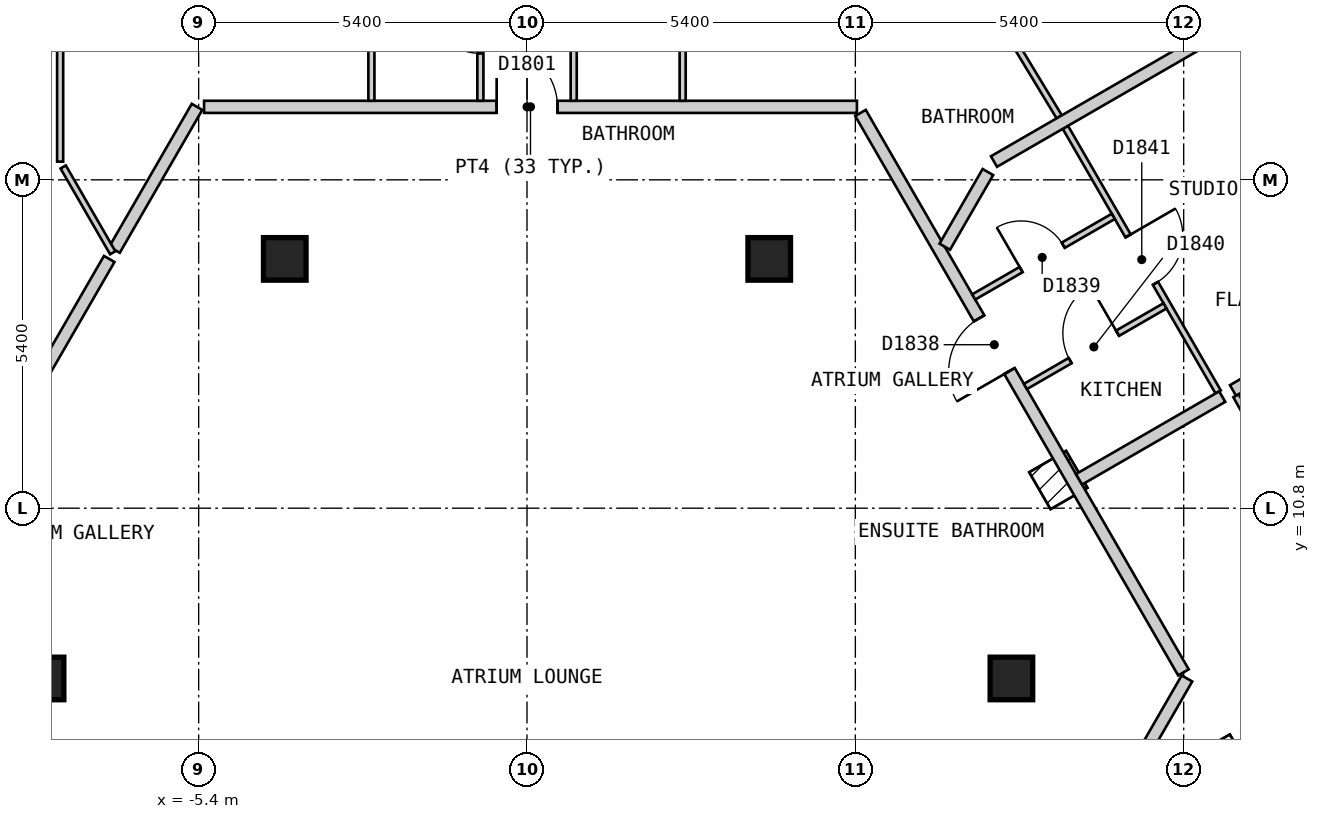
"""IFC4 building model, lengths in metres.
Left out: names, types, materials, properties, quantities, classifications, styles, units other than length and angle.
Written with IfcOpenShell. Run it as: python <this file> out.ifc"""

import sys

from ifc_helpers import new_model, si_unit, direction, frame, frame_2d, origin, origin_2d, place, context, subcontext, project, spatial, rectangle, extrude, element, fill, save


model = new_model("IFC4")
c1 = context("Model", 3, precision=1e-05, world=origin(), true_north=direction((0.0, 1.0)))
c2 = subcontext(c1, "Body", "Model", "MODEL_VIEW")
j1 = project(units=[si_unit("LENGTHUNIT", "METRE"), si_unit("PLANEANGLEUNIT", "RADIAN")], contexts=[c1])
p1 = place(None, origin())
s1 = spatial("IfcSite", under=j1, at=p1, CompositionType="ELEMENT")
p2 = place(p1, origin())
s2 = spatial("IfcBuilding", under=s1, at=p2, CompositionType="ELEMENT")
p3 = place(p2, frame((0.0, 0.0, 202.8)))
s3 = spatial("IfcBuildingStorey", under=s2, at=p3, CompositionType="ELEMENT", Elevation=202.8)
for number, where, z_axis, x_axis in (
    (1, (7.967, 8.0, 0.0), (0.0, 0.0, 1.0), (1.0, 0.0, 0.0)),
    (2, (3.984, 14.9, 0.0), (0.0, 0.0, 1.0), (1.0, 0.0, 0.0)),
    (3, (-3.984, 14.9, 0.0), (0.0, 0.0, 1.0), (1.0, 0.0, 0.0)),
    (4, (-7.967, 8.0, 0.0), (0.0, 0.0, 1.0), (1.0, 0.0, 0.0)),
):
    element("IfcColumn", number, at=place(p3, frame(where, z_axis=z_axis, x_axis=x_axis)), inside=s3, PredefinedType="COLUMN", context=c2, shape_type="SweptSolid", body=[
        extrude(rectangle(XDim=0.7, YDim=0.7, at=origin_2d()), origin(), (0.0, 0.0, 1.0), 3.0),
    ])
p4 = place(p3, frame((5.485, 17.3, 0.0), z_axis=(0.0, 0.0, 1.0), x_axis=(0.499943285704, -0.866058145322, 0.0)))
e5 = element("IfcWall", 5, at=p4, inside=s3, PredefinedType="PARTITIONING", context=c2, shape_type="SweptSolid", body=[
    extrude(rectangle(XDim=10.623, YDim=0.2, at=frame_2d((5.312, 0.0))), origin(), (0.0, 0.0, 1.0), 2.7),
])
p5 = place(p4, frame((3.901, 0.0, 0.0)))
e6 = element("IfcOpeningElement", 6, at=p5, cuts=e5, PredefinedType="OPENING", context=c2, shape_type="SweptSolid", body=[
    extrude(rectangle(XDim=1.0, YDim=2.1, at=frame_2d((0.5, 1.05))), frame((0.0, 0.11, 0.0), z_axis=(0.0, -1.0, 0.0), x_axis=(1.0, 0.0, 0.0)), (0.0, 0.0, 1.0), 0.22),
])
p6 = place(p3, frame((-5.311, 17.4, 0.0), z_axis=(0.0, 0.0, 1.0), x_axis=(1.0, 0.0, 0.0)))
e7 = element("IfcWall", 7, at=p6, inside=s3, PredefinedType="PARTITIONING", context=c2, shape_type="SweptSolid", body=[
    extrude(rectangle(XDim=10.737, YDim=0.2, at=frame_2d((5.369, 0.0))), origin(), (0.0, 0.0, 1.0), 2.7),
])
p7 = place(p6, frame((4.812, 0.0, 0.0)))
e8 = element("IfcOpeningElement", 8, at=p7, cuts=e7, PredefinedType="OPENING", context=c2, shape_type="SweptSolid", body=[
    extrude(rectangle(XDim=1.0, YDim=2.1, at=frame_2d((0.5, 1.05))), frame((0.0, 0.11, 0.0), z_axis=(0.0, -1.0, 0.0), x_axis=(1.0, 0.0, 0.0)), (0.0, 0.0, 1.0), 0.22),
])
p8 = place(p3, frame((9.404, 5.487, 0.0), z_axis=(0.0, 0.0, 1.0), x_axis=(0.499768590677, 0.866158966803, 0.0)))
e9 = element("IfcWall", 9, at=p8, inside=s3, PredefinedType="PARTITIONING", context=c2, shape_type="SweptSolid", body=[
    extrude(rectangle(XDim=2.901, YDim=0.2, at=frame_2d((1.451, 0.0))), origin(), (0.0, 0.0, 1.0), 2.7),
])
p9 = place(p3, frame((-10.826, 8.048, 0.0), z_axis=(0.0, 0.0, 1.0), x_axis=(0.499953104851, 0.866052477019, 0.0)))
e10 = element("IfcWall", 10, at=p9, inside=s3, PredefinedType="PARTITIONING", context=c2, shape_type="SweptSolid", body=[
    extrude(rectangle(XDim=7.91, YDim=0.2, at=frame_2d((3.955, 0.0))), origin(), (0.0, 0.0, 1.0), 2.7),
])
p10 = place(p9, frame((0.603, 0.0, 0.0)))
e11 = element("IfcOpeningElement", 11, at=p10, cuts=e10, PredefinedType="OPENING", context=c2, shape_type="SweptSolid", body=[
    extrude(rectangle(XDim=1.0, YDim=2.1, at=frame_2d((0.5, 1.05))), frame((0.0, 0.11, 0.0), z_axis=(0.0, -1.0, 0.0), x_axis=(1.0, 0.0, 0.0)), (0.0, 0.0, 1.0), 0.22),
])
p11 = place(p3, frame((-6.784, 15.05, 0.0), z_axis=(0.0, 0.0, 1.0), x_axis=(0.500067724834, 0.865986299303, 0.0)))
e12 = element("IfcWall", 12, at=p11, inside=s3, PredefinedType="PARTITIONING", context=c2, shape_type="SweptSolid", body=[
    extrude(rectangle(XDim=2.713, YDim=0.2, at=frame_2d((1.357, 0.0))), origin(), (0.0, 0.0, 1.0), 2.7),
])
p12 = place(p3, frame((7.033, 20.077, 0.0), z_axis=(0.0, 0.0, 1.0), x_axis=(0.517918779664, -0.855429797044, 0.0)))
e13 = element("IfcWall", 13, at=p12, inside=s3, PredefinedType="PARTITIONING", context=c2, shape_type="SweptSolid", body=[
    extrude(rectangle(XDim=3.321, YDim=0.1, at=frame_2d((1.661, 0.0))), origin(), (0.0, 0.0, 1.0), 2.7),
])
p13 = place(p3, frame((-7.628, 16.412, 0.0), z_axis=(0.0, 0.0, 1.0), x_axis=(0.499843439945, -0.866115774908, 0.0)))
e14 = element("IfcWall", 14, at=p13, inside=s3, PredefinedType="PARTITIONING", context=c2, shape_type="SweptSolid", body=[
    extrude(rectangle(XDim=1.63, YDim=0.1, at=frame_2d((0.815, 0.0))), origin(), (0.0, 0.0, 1.0), 2.7),
])
p14 = place(p3, frame((8.854, 17.064, 0.0), z_axis=(0.0, 0.0, 1.0), x_axis=(0.500042049778, -0.866001124973, 0.0)))
e15 = element("IfcWall", 15, at=p14, inside=s3, PredefinedType="PARTITIONING", context=c2, shape_type="SweptSolid", body=[
    extrude(rectangle(XDim=5.025, YDim=0.1, at=frame_2d((2.513, 0.0))), origin(), (0.0, 0.0, 1.0), 2.7),
])
p15 = place(p14, frame((2.063, 0.0, 0.0)))
e16 = element("IfcOpeningElement", 16, at=p15, cuts=e15, PredefinedType="OPENING", context=c2, shape_type="SweptSolid", body=[
    extrude(rectangle(XDim=0.9, YDim=2.1, at=frame_2d((0.45, 1.05))), frame((0.0, 0.06, 0.0), z_axis=(0.0, -1.0, 0.0), x_axis=(1.0, 0.0, 0.0)), (0.0, 0.0, 1.0), 0.12),
])
p16 = place(p3, frame((11.66, 12.65, 0.0), z_axis=(0.0, 0.0, 1.0), x_axis=(0.488650242737, -0.872479764965, 0.0)))
e17 = element("IfcWall", 17, at=p16, inside=s3, PredefinedType="PARTITIONING", context=c2, shape_type="SweptSolid", body=[
    extrude(rectangle(XDim=5.075, YDim=0.1, at=frame_2d((2.538, 0.0))), origin(), (0.0, 0.0, 1.0), 2.7),
])
p17 = place(p16, frame((2.113, 0.0, 0.0)))
e18 = element("IfcOpeningElement", 18, at=p17, cuts=e17, PredefinedType="OPENING", context=c2, shape_type="SweptSolid", body=[
    extrude(rectangle(XDim=0.8, YDim=2.1, at=frame_2d((0.4, 1.05))), frame((0.0, 0.06, 0.0), z_axis=(0.0, -1.0, 0.0), x_axis=(1.0, 0.0, 0.0)), (0.0, 0.0, 1.0), 0.12),
])
p18 = place(p3, frame((-2.559, 20.17, 0.0), z_axis=(0.0, 0.0, 1.0), x_axis=(0.0, -1.0, 0.0)))
e19 = element("IfcWall", 19, at=p18, inside=s3, PredefinedType="PARTITIONING", context=c2, shape_type="SweptSolid", body=[
    extrude(rectangle(XDim=2.67, YDim=0.1, at=frame_2d((1.335, 0.0))), origin(), (0.0, 0.0, 1.0), 2.7),
])
p19 = place(p3, frame((2.56, 20.03, 0.0), z_axis=(0.0, 0.0, 1.0), x_axis=(0.0, -1.0, 0.0)))
e20 = element("IfcWall", 20, at=p19, inside=s3, PredefinedType="PARTITIONING", context=c2, shape_type="SweptSolid", body=[
    extrude(rectangle(XDim=2.53, YDim=0.1, at=frame_2d((1.265, 0.0))), origin(), (0.0, 0.0, 1.0), 2.7),
])
p20 = place(p3, frame((0.768, 17.5, 0.0), z_axis=(0.0, 0.0, 1.0), x_axis=(0.0, 1.0, 0.0)))
e21 = element("IfcWall", 21, at=p20, inside=s3, PredefinedType="PARTITIONING", context=c2, shape_type="SweptSolid", body=[
    extrude(rectangle(XDim=2.51, YDim=0.1, at=frame_2d((1.255, 0.0))), origin(), (0.0, 0.0, 1.0), 2.7),
])
p21 = place(p20, frame((0.83, 0.0, 0.0)))
e22 = element("IfcOpeningElement", 22, at=p21, cuts=e21, PredefinedType="OPENING", context=c2, shape_type="SweptSolid", body=[
    extrude(rectangle(XDim=0.8, YDim=2.1, at=frame_2d((0.4, 1.05))), frame((0.0, 0.06, 0.0), z_axis=(0.0, -1.0, 0.0), x_axis=(1.0, 0.0, 0.0)), (0.0, 0.0, 1.0), 0.12),
])
p22 = place(p3, frame((-7.678, 16.499, 0.0), z_axis=(0.0, 0.0, 1.0), x_axis=(0.0, 1.0, 0.0)))
e23 = element("IfcWall", 23, at=p22, inside=s3, PredefinedType="PARTITIONING", context=c2, shape_type="SweptSolid", body=[
    extrude(rectangle(XDim=5.801, YDim=0.1, at=frame_2d((2.9, 0.0))), origin(), (0.0, 0.0, 1.0), 2.7),
])
p23 = place(p22, frame((3.44, 0.0, 0.0)))
e24 = element("IfcOpeningElement", 24, at=p23, cuts=e23, PredefinedType="OPENING", context=c2, shape_type="SweptSolid", body=[
    extrude(rectangle(XDim=0.9, YDim=2.1, at=frame_2d((0.45, 1.05))), frame((0.0, 0.06, 0.0), z_axis=(0.0, -1.0, 0.0), x_axis=(1.0, 0.0, 0.0)), (0.0, 0.0, 1.0), 0.12),
])
p24 = place(p3, frame((-0.767, 17.5, 0.0), z_axis=(0.0, 0.0, 1.0), x_axis=(0.0, 1.0, 0.0)))
e25 = element("IfcWall", 25, at=p24, inside=s3, PredefinedType="PARTITIONING", context=c2, shape_type="SweptSolid", body=[
    extrude(rectangle(XDim=2.559, YDim=0.1, at=frame_2d((1.28, 0.0))), origin(), (0.0, 0.0, 1.0), 2.7),
])
p25 = place(p24, frame((0.78, 0.0, 0.0)))
e26 = element("IfcOpeningElement", 26, at=p25, cuts=e25, PredefinedType="OPENING", context=c2, shape_type="SweptSolid", body=[
    extrude(rectangle(XDim=0.9, YDim=2.1, at=frame_2d((0.45, 1.05))), frame((0.0, 0.06, 0.0), z_axis=(0.0, -1.0, 0.0), x_axis=(1.0, 0.0, 0.0)), (0.0, 0.0, 1.0), 0.12),
])
p26 = place(p3, frame((9.354, 5.401, 0.0), z_axis=(0.0, 0.0, 1.0), x_axis=(0.866018411306, 0.500012111133, 0.0)))
e27 = element("IfcWall", 27, at=p26, inside=s3, PredefinedType="PARTITIONING", context=c2, shape_type="SweptSolid", body=[
    extrude(rectangle(XDim=9.898, YDim=0.1, at=frame_2d((4.949, 0.0))), origin(), (0.0, 0.0, 1.0), 2.7),
])
p27 = place(p26, frame((7.277, 0.0, 0.0)))
e28 = element("IfcOpeningElement", 28, at=p27, cuts=e27, PredefinedType="OPENING", context=c2, shape_type="SweptSolid", body=[
    extrude(rectangle(XDim=0.9, YDim=2.1, at=frame_2d((0.45, 1.05))), frame((0.0, 0.06, 0.0), z_axis=(0.0, -1.0, 0.0), x_axis=(1.0, 0.0, 0.0)), (0.0, 0.0, 1.0), 0.12),
])
p28 = place(p3, frame((8.197, 12.802, 0.0), z_axis=(0.0, 0.0, 1.0), x_axis=(0.866029095148, 0.499993606316, 0.0)))
e29 = element("IfcWall", 29, at=p28, inside=s3, PredefinedType="PARTITIONING", context=c2, shape_type="SweptSolid", body=[
    extrude(rectangle(XDim=2.65, YDim=0.1, at=frame_2d((1.325, 0.0))), origin(), (0.0, 0.0, 1.0), 2.7),
])
p29 = place(p28, frame((0.85, 0.0, 0.0)))
e30 = element("IfcOpeningElement", 30, at=p29, cuts=e29, PredefinedType="OPENING", context=c2, shape_type="SweptSolid", body=[
    extrude(rectangle(XDim=0.9, YDim=2.1, at=frame_2d((0.45, 1.05))), frame((0.0, 0.06, 0.0), z_axis=(0.0, -1.0, 0.0), x_axis=(1.0, 0.0, 0.0)), (0.0, 0.0, 1.0), 0.12),
])
p30 = place(p3, frame((7.347, 14.274, 0.0), z_axis=(0.0, 0.0, 1.0), x_axis=(0.86601223543, 0.500022807565, 0.0)))
e31 = element("IfcWall", 31, at=p30, inside=s3, PredefinedType="PARTITIONING", context=c2, shape_type="SweptSolid", body=[
    extrude(rectangle(XDim=2.65, YDim=0.1, at=frame_2d((1.325, 0.0))), origin(), (0.0, 0.0, 1.0), 2.7),
])
p31 = place(p30, frame((0.9, 0.0, 0.0)))
e32 = element("IfcOpeningElement", 32, at=p31, cuts=e31, PredefinedType="OPENING", context=c2, shape_type="SweptSolid", body=[
    extrude(rectangle(XDim=0.8, YDim=2.1, at=frame_2d((0.4, 1.05))), frame((0.0, 0.06, 0.0), z_axis=(0.0, -1.0, 0.0), x_axis=(1.0, 0.0, 0.0)), (0.0, 0.0, 1.0), 0.12),
])
p32 = place(p3, frame((6.871, 15.1, 0.0), z_axis=(0.0, 0.0, 1.0), x_axis=(0.50006528296, 0.865987709369, 0.0)))
e33 = element("IfcWall", 33, at=p32, inside=s3, PredefinedType="PARTITIONING", context=c2, shape_type="SweptSolid", body=[
    extrude(rectangle(XDim=1.418, YDim=0.2, at=frame_2d((0.709, 0.0))), origin(), (0.0, 0.0, 1.0), 2.7),
])
p33 = place(p3, frame((9.079, 11.275, 0.0), z_axis=(0.0, 0.0, 1.0), x_axis=(0.865952340496, 0.500126527981, 0.0)))
e34 = element("IfcWall", 34, at=p33, inside=s3, PredefinedType="PARTITIONING", context=c2, shape_type="SweptSolid", body=[
    extrude(rectangle(XDim=2.719, YDim=0.2, at=frame_2d((1.36, 0.0))), origin(), (0.0, 0.0, 1.0), 2.7),
])
p34 = place(p3, frame((11.611, 12.737, 0.0), z_axis=(0.0, 0.0, 1.0), x_axis=(0.866017282483, 0.500014066243, 0.0)))
e35 = element("IfcWall", 35, at=p34, inside=s3, PredefinedType="PARTITIONING", context=c2, shape_type="SweptSolid", body=[
    extrude(rectangle(XDim=4.276, YDim=0.2, at=frame_2d((2.138, 0.0))), origin(), (0.0, 0.0, 1.0), 2.7),
])
p35 = place(p3, frame((7.68, 16.501, 0.0), z_axis=(0.0, 0.0, 1.0), x_axis=(0.86602149507, 0.500006770031, 0.0)))
e36 = element("IfcWall", 36, at=p35, inside=s3, PredefinedType="PARTITIONING", context=c2, shape_type="SweptSolid", body=[
    extrude(rectangle(XDim=5.798, YDim=0.2, at=frame_2d((2.899, 0.0))), origin(), (0.0, 0.0, 1.0), 2.7),
])
p36 = place(p3, frame((-11.417, 12.625, 0.0), z_axis=(0.0, 0.0, 1.0), x_axis=(0.500007885066, 0.866020851292, 0.0)))
e37 = element("IfcWall", 37, at=p36, inside=s3, PredefinedType="PARTITIONING", context=c2, shape_type="SweptSolid", body=[
    extrude(rectangle(XDim=7.33, YDim=0.1, at=frame_2d((3.665, 0.0))), origin(), (0.0, 0.0, 1.0), 2.7),
])
p37 = place(p36, frame((3.328, 0.0, 0.0)))
e38 = element("IfcOpeningElement", 38, at=p37, cuts=e37, PredefinedType="OPENING", context=c2, shape_type="SweptSolid", body=[
    extrude(rectangle(XDim=0.8, YDim=2.1, at=frame_2d((0.4, 1.05))), frame((0.0, 0.06, 0.0), z_axis=(0.0, -1.0, 0.0), x_axis=(1.0, 0.0, 0.0)), (0.0, 0.0, 1.0), 0.12),
])
p38 = place(p7, origin())
e39 = element("IfcDoor", 39, at=p38, inside=s3, OperationType="SINGLE_SWING_LEFT", PredefinedType="DOOR", context=c2, shape_type="SweptSolid", body=[
    extrude(rectangle(XDim=1.0, YDim=2.1, at=frame_2d((0.5, 1.05))), frame((0.0, 0.025, 0.0), z_axis=(0.0, -1.0, 0.0), x_axis=(1.0, 0.0, 0.0)), (0.0, 0.0, 1.0), 0.05),
])
fill(e8, e39)
p39 = place(p25, origin())
e40 = element("IfcDoor", 40, at=p39, inside=s3, OperationType="SINGLE_SWING_RIGHT", PredefinedType="DOOR", context=c2, shape_type="SweptSolid", body=[
    extrude(rectangle(XDim=0.9, YDim=2.1, at=frame_2d((0.45, 1.05))), frame((0.0, 0.025, 0.0), z_axis=(0.0, -1.0, 0.0), x_axis=(1.0, 0.0, 0.0)), (0.0, 0.0, 1.0), 0.05),
])
fill(e26, e40)
p40 = place(p5, origin())
e41 = element("IfcDoor", 41, at=p40, inside=s3, OperationType="SINGLE_SWING_RIGHT", PredefinedType="DOOR", context=c2, shape_type="SweptSolid", body=[
    extrude(rectangle(XDim=1.0, YDim=2.1, at=frame_2d((0.5, 1.05))), frame((0.0, 0.025, 0.0), z_axis=(0.0, -1.0, 0.0), x_axis=(1.0, 0.0, 0.0)), (0.0, 0.0, 1.0), 0.05),
])
fill(e6, e41)
p41 = place(p31, origin())
e42 = element("IfcDoor", 42, at=p41, inside=s3, OperationType="SINGLE_SWING_LEFT", PredefinedType="DOOR", context=c2, shape_type="SweptSolid", body=[
    extrude(rectangle(XDim=0.8, YDim=2.1, at=frame_2d((0.4, 1.05))), frame((0.0, 0.025, 0.0), z_axis=(0.0, -1.0, 0.0), x_axis=(1.0, 0.0, 0.0)), (0.0, 0.0, 1.0), 0.05),
])
fill(e32, e42)
p42 = place(p29, origin())
e43 = element("IfcDoor", 43, at=p42, inside=s3, OperationType="SINGLE_SWING_RIGHT", PredefinedType="DOOR", context=c2, shape_type="SweptSolid", body=[
    extrude(rectangle(XDim=0.9, YDim=2.1, at=frame_2d((0.45, 1.05))), frame((0.0, 0.025, 0.0), z_axis=(0.0, -1.0, 0.0), x_axis=(1.0, 0.0, 0.0)), (0.0, 0.0, 1.0), 0.05),
])
fill(e30, e43)
p43 = place(p15, origin())
e44 = element("IfcDoor", 44, at=p43, inside=s3, OperationType="SINGLE_SWING_LEFT", PredefinedType="DOOR", context=c2, shape_type="SweptSolid", body=[
    extrude(rectangle(XDim=0.9, YDim=2.1, at=frame_2d((0.45, 1.05))), frame((0.0, 0.025, 0.0), z_axis=(0.0, -1.0, 0.0), x_axis=(1.0, 0.0, 0.0)), (0.0, 0.0, 1.0), 0.05),
])
fill(e16, e44)
save(model, sys.argv[1])
